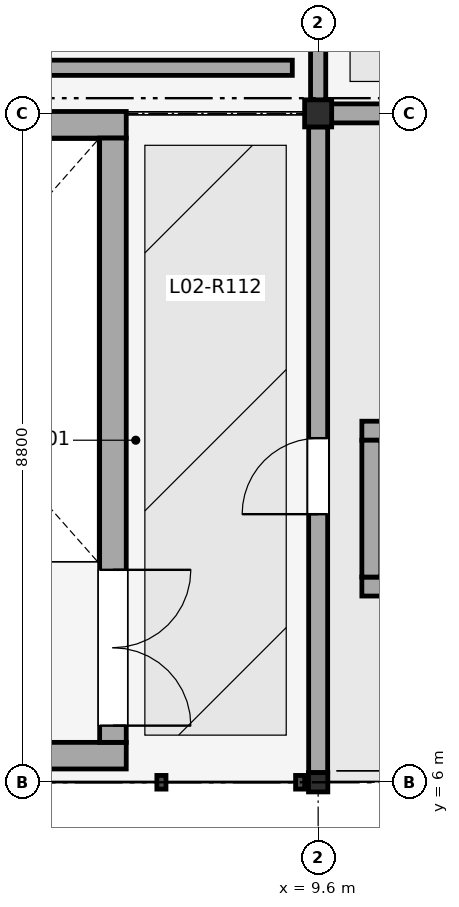
"""IFC4 building model, lengths in metres.
Left out: names, types, materials, properties, quantities, classifications, styles, units other than length and angle.
Written with IfcOpenShell. Run it as: python <this file> out.ifc"""

import sys

from ifc_helpers import new_model, si_unit, direction, frame, frame_2d, origin, origin_2d, place, context, subcontext, project, spatial, rectangle, hollow_rectangle, i_section, extrude, element, fill, save


model = new_model("IFC4")
c1 = context("Model", 3, precision=1e-05, world=origin(), true_north=direction((0.0, 1.0)))
c2 = subcontext(c1, "Body", "Model", "MODEL_VIEW")
j1 = project(units=[si_unit("LENGTHUNIT", "METRE"), si_unit("PLANEANGLEUNIT", "RADIAN")], contexts=[c1])
p1 = place(None, origin())
s1 = spatial("IfcSite", under=j1, at=p1, CompositionType="ELEMENT")
p2 = place(p1, origin())
s2 = spatial("IfcBuilding", under=s1, at=p2, CompositionType="ELEMENT")
p3 = place(p2, frame((0.0, 0.0, 9.6)))
s3 = spatial("IfcBuildingStorey", under=s2, at=p3, CompositionType="ELEMENT", Elevation=9.6)
p4 = place(p3, frame((9.6, 6.0, 0.0), z_axis=(0.0, 0.0, 1.0), x_axis=(1.0, 0.0, 0.0)))
e1 = element("IfcColumn", 1, at=p4, inside=s3, PredefinedType="COLUMN", context=c2, shape_type="SweptSolid", body=[
    extrude(hollow_rectangle(XDim=0.254, YDim=0.254, WallThickness=0.012, at=origin_2d()), origin(), (0.0, 0.0, 1.0), 4.622),
])
p5 = place(p3, frame((9.6, 14.8, 0.0), z_axis=(0.0, 0.0, 1.0), x_axis=(1.0, 0.0, 0.0)))
e2 = element("IfcColumn", 2, at=p5, inside=s3, PredefinedType="COLUMN", context=c2, shape_type="SweptSolid", body=[
    extrude(i_section(OverallWidth=0.356, OverallDepth=0.356, WebThickness=0.011, FlangeThickness=0.018, FilletRadius=0.025, at=origin_2d()), origin(), (0.0, 0.0, 1.0), 5.629),
])
p6 = place(p3, frame((9.6, 14.8, 0.0), z_axis=(0.0, 0.0, 1.0), x_axis=(1.0, 0.0, 0.0)))
e3 = element("IfcWall", 3, at=p6, inside=s3, PredefinedType="STANDARD", context=c2, shape_type="SweptSolid", body=[
    extrude(rectangle(XDim=9.6, YDim=0.25, at=frame_2d((4.8, 0.0))), origin(), (0.0, 0.0, 1.0), 3.5),
])
p7 = place(p6, frame((3.6, 0.0, 0.0)))
e4 = element("IfcOpeningElement", 4, at=p7, cuts=e3, PredefinedType="OPENING", context=c2, shape_type="SweptSolid", body=[
    extrude(rectangle(XDim=1.48, YDim=2.11, at=frame_2d((0.74, 1.055))), frame((0.0, 0.135, 0.0), z_axis=(0.0, -1.0, 0.0), x_axis=(1.0, 0.0, 0.0)), (0.0, 0.0, 1.0), 0.27),
])
p8 = place(p6, frame((1.1, 0.0, 0.85)))
e5 = element("IfcOpeningElement", 5, at=p8, cuts=e3, PredefinedType="OPENING", context=c2, shape_type="SweptSolid", body=[
    extrude(rectangle(XDim=1.68, YDim=1.71, at=frame_2d((0.84, 0.855))), frame((0.0, 0.135, 0.0), z_axis=(0.0, -1.0, 0.0), x_axis=(1.0, 0.0, 0.0)), (0.0, 0.0, 1.0), 0.27),
])
p9 = place(p3, frame((9.6, 6.127, 0.0), z_axis=(0.0, 0.0, 1.0), x_axis=(0.0, 1.0, 0.0)))
e6 = element("IfcWall", 6, at=p9, inside=s3, PredefinedType="STANDARD", context=c2, shape_type="SweptSolid", body=[
    extrude(rectangle(XDim=8.495, YDim=0.25, at=frame_2d((4.248, 0.0))), origin(), (0.0, 0.0, 1.0), 3.5),
])
p10 = place(p9, frame((3.4, 0.0, 0.0)))
e7 = element("IfcOpeningElement", 7, at=p10, cuts=e6, PredefinedType="OPENING", context=c2, shape_type="SweptSolid", body=[
    extrude(rectangle(XDim=1.0, YDim=2.2, at=frame_2d((0.5, 1.1))), frame((0.0, 0.135, 0.0), z_axis=(0.0, -1.0, 0.0), x_axis=(1.0, 0.0, 0.0)), (0.0, 0.0, 1.0), 0.27),
])
for number, where, z_axis, x_axis in (
    (8, (7.075, 6.35, 0.0), (0.0, 0.0, 1.0), (-1.0, 0.0, 0.0)),
    (9, (1.425, 14.65, 0.0), (0.0, 0.0, 1.0), (1.0, 0.0, 0.0)),
):
    element("IfcWall", number, at=place(p3, frame(where, z_axis=z_axis, x_axis=x_axis)), inside=s3, PredefinedType="SHEAR", context=c2, shape_type="SweptSolid", body=[
        extrude(rectangle(XDim=5.65, YDim=0.35, at=frame_2d((2.825, 0.0))), origin(), (0.0, 0.0, 1.0), 3.85),
    ])
p11 = place(p3, frame((6.9, 14.475, 0.0), z_axis=(0.0, 0.0, 1.0), x_axis=(0.0, -1.0, 0.0)))
e10 = element("IfcWall", 10, at=p11, inside=s3, PredefinedType="SHEAR", context=c2, shape_type="SweptSolid", body=[
    extrude(rectangle(XDim=7.95, YDim=0.35, at=frame_2d((3.975, 0.0))), origin(), (0.0, 0.0, 1.0), 3.85),
])
p12 = place(p11, frame((5.68, 0.0, 0.0)))
e11 = element("IfcOpeningElement", 11, at=p12, cuts=e10, PredefinedType="OPENING", context=c2, shape_type="SweptSolid", body=[
    extrude(rectangle(XDim=2.05, YDim=2.15, at=frame_2d((1.025, 1.075))), frame((0.0, 0.185, 0.0), z_axis=(0.0, -1.0, 0.0), x_axis=(1.0, 0.0, 0.0)), (0.0, 0.0, 1.0), 0.37),
])
p13 = place(p3, frame((13.025, 8.575, 0.0), z_axis=(0.0, 0.0, 1.0), x_axis=(-1.0, 0.0, 0.0)))
e12 = element("IfcWall", 12, at=p13, inside=s3, PredefinedType="SOLIDWALL", context=c2, shape_type="SweptSolid", body=[
    extrude(rectangle(XDim=2.85, YDim=0.25, at=frame_2d((1.425, 0.0))), origin(), (0.0, 0.0, 1.0), 3.55),
])
p14 = place(p3, frame((10.175, 10.625, 0.0), z_axis=(0.0, 0.0, 1.0), x_axis=(1.0, 0.0, 0.0)))
e13 = element("IfcWall", 13, at=p14, inside=s3, PredefinedType="SOLIDWALL", context=c2, shape_type="SweptSolid", body=[
    extrude(rectangle(XDim=2.85, YDim=0.25, at=frame_2d((1.425, 0.0))), origin(), (0.0, 0.0, 1.0), 3.55),
])
p15 = place(p14, frame((0.875, 0.0, 0.0)))
e14 = element("IfcOpeningElement", 14, at=p15, cuts=e13, PredefinedType="OPENING", context=c2, shape_type="SweptSolid", body=[
    extrude(rectangle(XDim=1.1, YDim=2.15, at=frame_2d((0.55, 1.075))), frame((0.0, 0.135, 0.0), z_axis=(0.0, -1.0, 0.0), x_axis=(1.0, 0.0, 0.0)), (0.0, 0.0, 1.0), 0.27),
])
p16 = place(p3, frame((10.3, 8.7, 0.0), z_axis=(0.0, 0.0, 1.0), x_axis=(0.0, 1.0, 0.0)))
e15 = element("IfcWall", 15, at=p16, inside=s3, PredefinedType="SOLIDWALL", context=c2, shape_type="SweptSolid", body=[
    extrude(rectangle(XDim=1.8, YDim=0.25, at=frame_2d((0.9, 0.0))), origin(), (0.0, 0.0, 1.0), 3.55),
])
p17 = place(p3, frame((9.6, 14.85, 0.0), z_axis=(0.0, 0.0, 1.0), x_axis=(0.0, 1.0, 0.0)))
e16 = element("IfcWall", 16, at=p17, inside=s3, PredefinedType="PARTITIONING", context=c2, shape_type="SweptSolid", body=[
    extrude(rectangle(XDim=21.45, YDim=0.2, at=frame_2d((10.725, 0.0))), origin(), (0.0, 0.0, 1.0), 3.4),
])
p18 = place(p17, frame((9.925, 0.0, 0.0)))
e17 = element("IfcOpeningElement", 17, at=p18, cuts=e16, PredefinedType="OPENING", context=c2, shape_type="SweptSolid", body=[
    extrude(rectangle(XDim=1.6, YDim=2.15, at=frame_2d((0.8, 1.075))), frame((0.0, 0.11, 0.0), z_axis=(0.0, -1.0, 0.0), x_axis=(1.0, 0.0, 0.0)), (0.0, 0.0, 1.0), 0.22),
])
p19 = place(p3, frame((0.05, 15.4, 0.0), z_axis=(0.0, 0.0, 1.0), x_axis=(1.0, 0.0, 0.0)))
e18 = element("IfcWall", 18, at=p19, inside=s3, PredefinedType="PARTITIONING", context=c2, shape_type="SweptSolid", body=[
    extrude(rectangle(XDim=9.21, YDim=0.2, at=frame_2d((4.605, 0.0))), origin(), (0.0, 0.0, 1.0), 3.4),
])
p20 = place(p10, origin())
e19 = element("IfcDoor", 19, at=p20, inside=s3, OperationType="SINGLE_SWING_LEFT", PredefinedType="DOOR", context=c2, shape_type="SweptSolid", body=[
    extrude(rectangle(XDim=1.0, YDim=2.2, at=frame_2d((0.5, 1.1))), frame((0.0, 0.025, 0.0), z_axis=(0.0, -1.0, 0.0), x_axis=(1.0, 0.0, 0.0)), (0.0, 0.0, 1.0), 0.05),
])
fill(e7, e19)
p21 = place(p12, origin())
e20 = element("IfcDoor", 20, at=p21, inside=s3, OperationType="DOUBLE_DOOR_SINGLE_SWING", PredefinedType="DOOR", context=c2, shape_type="SweptSolid", body=[
    extrude(rectangle(XDim=2.05, YDim=2.15, at=frame_2d((1.025, 1.075))), frame((0.0, 0.025, 0.0), z_axis=(0.0, -1.0, 0.0), x_axis=(1.0, 0.0, 0.0)), (0.0, 0.0, 1.0), 0.05),
])
fill(e11, e20)
save(model, sys.argv[1])
